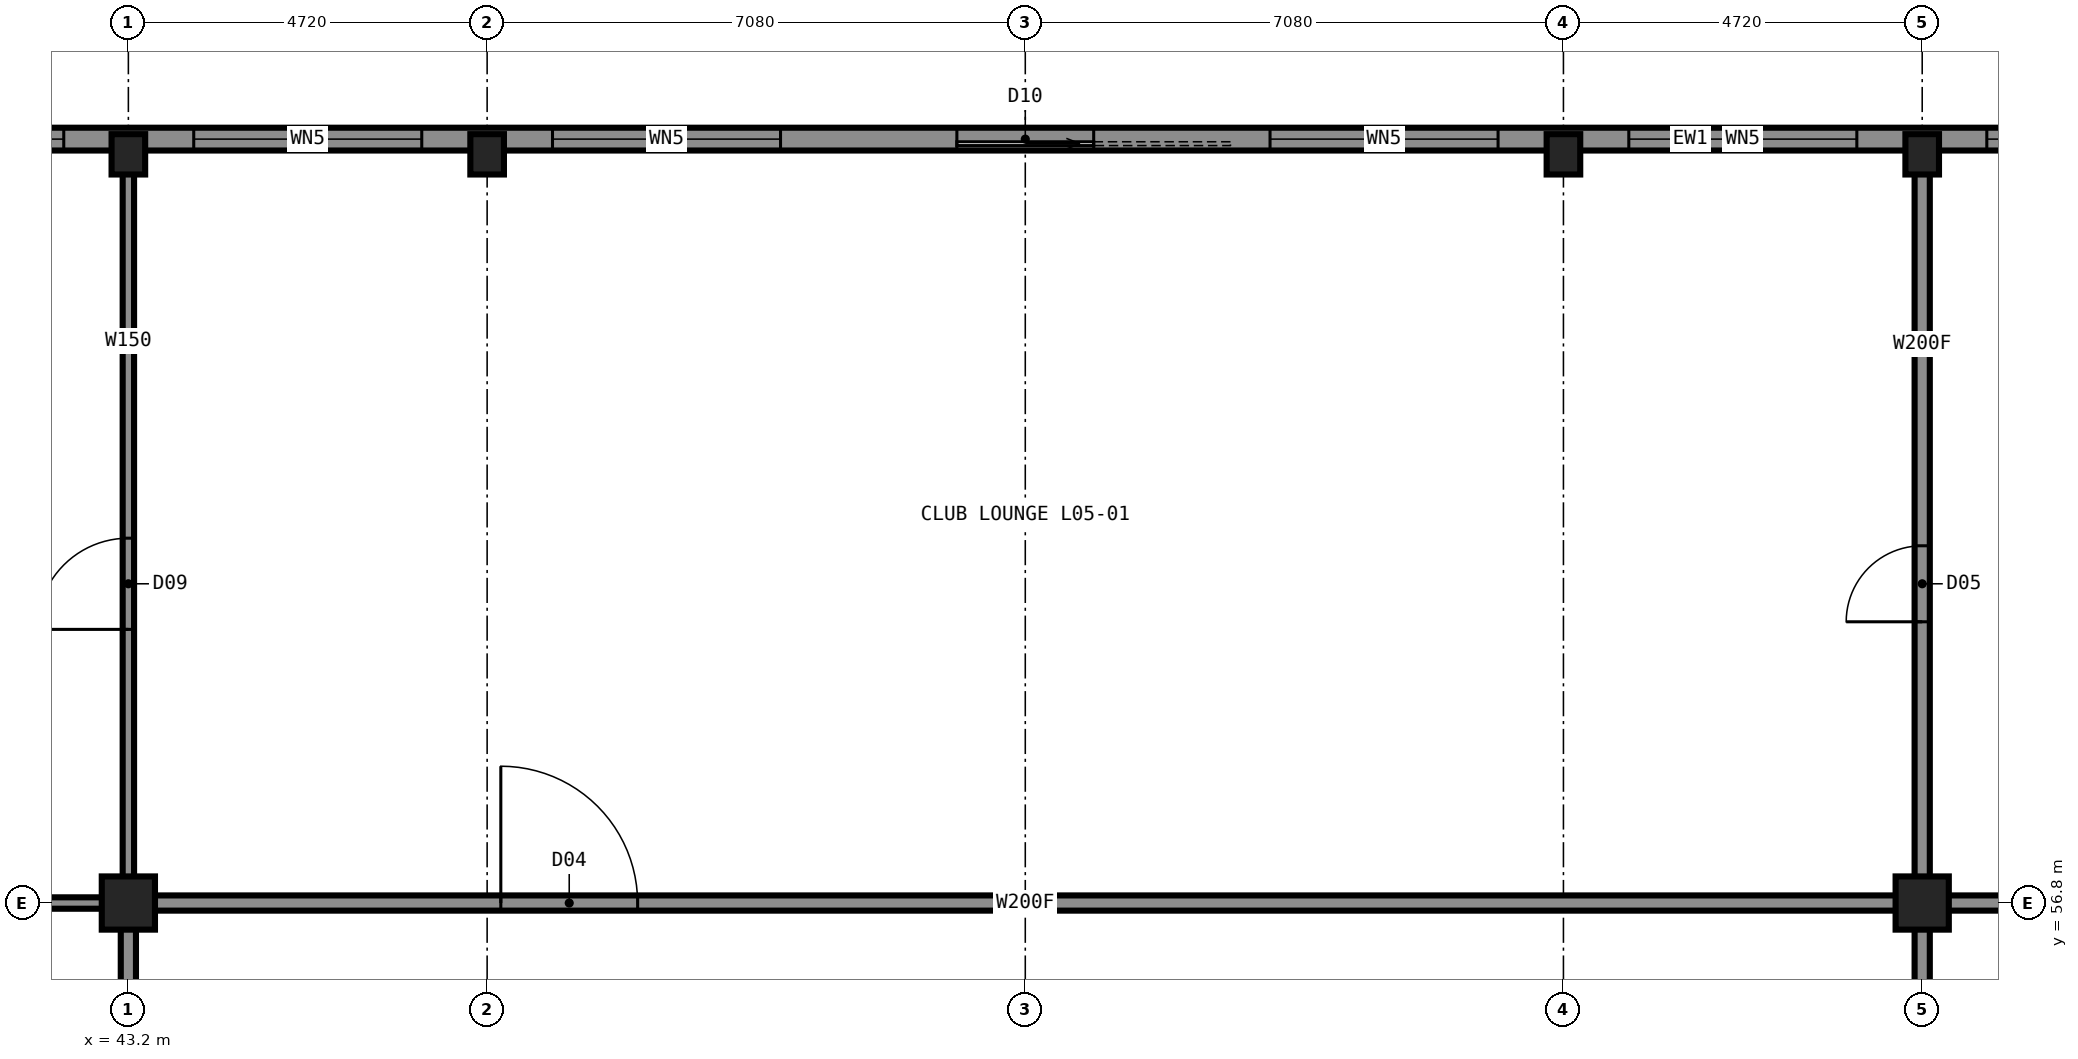
"""IFC4 building model, lengths in metres.
Left out: names, types, materials, properties, quantities, classifications, styles, units other than length and angle.
Written with IfcOpenShell. Run it as: python <this file> out.ifc"""

import sys

from ifc_helpers import new_model, si_unit, direction, frame, frame_2d, origin, origin_2d, place, context, subcontext, project, spatial, rectangle, hollow_rectangle, i_section, extrude, element, fill, save


model = new_model("IFC4")
c1 = context("Model", 3, precision=1e-05, world=origin(), true_north=direction((0.0, 1.0)))
c2 = subcontext(c1, "Body", "Model", "MODEL_VIEW")
j1 = project(units=[si_unit("LENGTHUNIT", "METRE"), si_unit("PLANEANGLEUNIT", "RADIAN")], contexts=[c1])
p1 = place(None, origin())
s1 = spatial("IfcSite", under=j1, at=p1, CompositionType="ELEMENT")
p2 = place(p1, origin())
s2 = spatial("IfcBuilding", under=s1, at=p2, CompositionType="ELEMENT")
p3 = place(p2, frame((0.0, 0.0, 25.0)))
s3 = spatial("IfcBuildingStorey", under=s2, at=p3, CompositionType="ELEMENT", Elevation=25.0)
for number, where, z_axis, x_axis in (
    (1, (43.2, 66.65, 0.0), (0.0, 0.0, 1.0), (1.0, 0.0, 0.0)),
    (2, (47.92, 66.65, 0.0), (0.0, 0.0, 1.0), (1.0, 0.0, 0.0)),
    (3, (62.08, 66.65, 0.0), (0.0, 0.0, 1.0), (1.0, 0.0, 0.0)),
    (4, (66.8, 66.65, 0.0), (0.0, 0.0, 1.0), (1.0, 0.0, 0.0)),
):
    element("IfcColumn", number, at=place(p3, frame(where, z_axis=z_axis, x_axis=x_axis)), inside=s3, PredefinedType="COLUMN", context=c2, shape_type="SweptSolid", body=[
        extrude(i_section(OverallWidth=0.442, OverallDepth=0.531, WebThickness=0.066, FlangeThickness=0.106, at=origin_2d()), origin(), (0.0, 0.0, 1.0), 3.5),
    ])
for number, where, z_axis, x_axis in (
    (5, (43.2, 56.8, 0.0), (0.0, 0.0, 1.0), (1.0, 0.0, 0.0)),
    (6, (66.8, 56.8, 0.0), (0.0, 0.0, 1.0), (1.0, 0.0, 0.0)),
):
    element("IfcColumn", number, at=place(p3, frame(where, z_axis=z_axis, x_axis=x_axis)), inside=s3, PredefinedType="COLUMN", context=c2, shape_type="SweptSolid", body=[
        extrude(hollow_rectangle(XDim=0.7, YDim=0.7, WallThickness=0.06, at=origin_2d()), origin(), (0.0, 0.0, 1.0), 3.5),
    ])
p4 = place(p3, frame((43.2, 56.8, 0.0), z_axis=(0.0, 0.0, 1.0), x_axis=(1.0, 0.0, 0.0)))
e7 = element("IfcWall", 7, at=p4, inside=s3, PredefinedType="PARTITIONING", context=c2, shape_type="SweptSolid", body=[
    extrude(rectangle(XDim=23.6, YDim=0.2, at=frame_2d((11.8, 0.0))), origin(), (0.0, 0.0, 1.0), 3.33),
])
p5 = place(p4, frame((4.9, 0.0, 0.0)))
e8 = element("IfcOpeningElement", 8, at=p5, cuts=e7, PredefinedType="OPENING", context=c2, shape_type="SweptSolid", body=[
    extrude(rectangle(XDim=1.8, YDim=2.2, at=frame_2d((0.9, 1.1))), frame((0.0, 0.11, 0.0), z_axis=(0.0, -1.0, 0.0), x_axis=(1.0, 0.0, 0.0)), (0.0, 0.0, 1.0), 0.22),
])
p6 = place(p3, frame((66.8, 56.8, 0.0), z_axis=(0.0, 0.0, 1.0), x_axis=(1.0, 0.0, 0.0)))
e9 = element("IfcWall", 9, at=p6, inside=s3, PredefinedType="PARTITIONING", context=c2, shape_type="SweptSolid", body=[
    extrude(rectangle(XDim=9.9, YDim=0.2, at=frame_2d((4.95, 0.0))), origin(), (0.0, 0.0, 1.0), 2.573),
])
p7 = place(p3, frame((33.3, 56.8, 0.0), z_axis=(0.0, 0.0, 1.0), x_axis=(1.0, 0.0, 0.0)))
e10 = element("IfcWall", 10, at=p7, inside=s3, PredefinedType="PARTITIONING", context=c2, shape_type="SweptSolid", body=[
    extrude(rectangle(XDim=9.9, YDim=0.15, at=frame_2d((4.95, 0.0))), origin(), (0.0, 0.0, 1.0), 2.573),
])
p8 = place(p3, frame((43.2, 33.2, 0.0), z_axis=(0.0, 0.0, 1.0), x_axis=(0.0, 1.0, 0.0)))
e11 = element("IfcWall", 11, at=p8, inside=s3, PredefinedType="PARTITIONING", context=c2, shape_type="SweptSolid", body=[
    extrude(rectangle(XDim=23.6, YDim=0.2, at=frame_2d((11.8, 0.0))), origin(), (0.0, 0.0, 1.0), 3.33),
])
p9 = place(p8, frame((13.2, 0.0, 0.0)))
e12 = element("IfcOpeningElement", 12, at=p9, cuts=e11, PredefinedType="OPENING", context=c2, shape_type="SweptSolid", body=[
    extrude(rectangle(XDim=1.2, YDim=2.2, at=frame_2d((0.6, 1.1))), frame((0.0, 0.11, 0.0), z_axis=(0.0, -1.0, 0.0), x_axis=(1.0, 0.0, 0.0)), (0.0, 0.0, 1.0), 0.22),
])
p10 = place(p3, frame((43.2, 56.8, 0.0), z_axis=(0.0, 0.0, 1.0), x_axis=(0.0, 1.0, 0.0)))
e13 = element("IfcWall", 13, at=p10, inside=s3, PredefinedType="PARTITIONING", context=c2, shape_type="SweptSolid", body=[
    extrude(rectangle(XDim=9.9, YDim=0.15, at=frame_2d((4.95, 0.0))), origin(), (0.0, 0.0, 1.0), 2.573),
])
p11 = place(p10, frame((3.6, 0.0, 0.0)))
e14 = element("IfcOpeningElement", 14, at=p11, cuts=e13, PredefinedType="OPENING", context=c2, shape_type="SweptSolid", body=[
    extrude(rectangle(XDim=1.2, YDim=2.2, at=frame_2d((0.6, 1.1))), frame((0.0, 0.085, 0.0), z_axis=(0.0, -1.0, 0.0), x_axis=(1.0, 0.0, 0.0)), (0.0, 0.0, 1.0), 0.17),
])
p12 = place(p3, frame((66.8, 33.2, 0.0), z_axis=(0.0, 0.0, 1.0), x_axis=(0.0, 1.0, 0.0)))
e15 = element("IfcWall", 15, at=p12, inside=s3, PredefinedType="PARTITIONING", context=c2, shape_type="SweptSolid", body=[
    extrude(rectangle(XDim=23.6, YDim=0.2, at=frame_2d((11.8, 0.0))), origin(), (0.0, 0.0, 1.0), 3.33),
])
p13 = place(p12, frame((18.2, 0.0, 0.0)))
e16 = element("IfcOpeningElement", 16, at=p13, cuts=e15, PredefinedType="OPENING", context=c2, shape_type="SweptSolid", body=[
    extrude(rectangle(XDim=1.2, YDim=2.2, at=frame_2d((0.6, 1.1))), frame((0.0, 0.11, 0.0), z_axis=(0.0, -1.0, 0.0), x_axis=(1.0, 0.0, 0.0)), (0.0, 0.0, 1.0), 0.22),
])
p14 = place(p12, frame((10.12, 0.0, 0.0)))
e17 = element("IfcOpeningElement", 17, at=p14, cuts=e15, PredefinedType="OPENING", context=c2, shape_type="SweptSolid", body=[
    extrude(rectangle(XDim=1.0, YDim=2.1, at=frame_2d((0.5, 1.05))), frame((0.0, 0.11, 0.0), z_axis=(0.0, -1.0, 0.0), x_axis=(1.0, 0.0, 0.0)), (0.0, 0.0, 1.0), 0.22),
])
p15 = place(p12, frame((12.53, 0.0, 0.0)))
e18 = element("IfcOpeningElement", 18, at=p15, cuts=e15, PredefinedType="OPENING", context=c2, shape_type="SweptSolid", body=[
    extrude(rectangle(XDim=0.9, YDim=2.1, at=frame_2d((0.45, 1.05))), frame((0.0, 0.11, 0.0), z_axis=(0.0, -1.0, 0.0), x_axis=(1.0, 0.0, 0.0)), (0.0, 0.0, 1.0), 0.22),
])
p16 = place(p12, frame((1.91, 0.0, 0.0)))
e19 = element("IfcOpeningElement", 19, at=p16, cuts=e15, PredefinedType="OPENING", context=c2, shape_type="SweptSolid", body=[
    extrude(rectangle(XDim=0.9, YDim=2.1, at=frame_2d((0.45, 1.05))), frame((0.0, 0.11, 0.0), z_axis=(0.0, -1.0, 0.0), x_axis=(1.0, 0.0, 0.0)), (0.0, 0.0, 1.0), 0.22),
])
p17 = place(p12, frame((6.63, 0.0, 0.0)))
e20 = element("IfcOpeningElement", 20, at=p17, cuts=e15, PredefinedType="OPENING", context=c2, shape_type="SweptSolid", body=[
    extrude(rectangle(XDim=0.9, YDim=2.1, at=frame_2d((0.45, 1.05))), frame((0.0, 0.11, 0.0), z_axis=(0.0, -1.0, 0.0), x_axis=(1.0, 0.0, 0.0)), (0.0, 0.0, 1.0), 0.22),
])
p18 = place(p3, frame((66.8, 56.8, 0.0), z_axis=(0.0, 0.0, 1.0), x_axis=(0.0, 1.0, 0.0)))
e21 = element("IfcWall", 21, at=p18, inside=s3, PredefinedType="PARTITIONING", context=c2, shape_type="SweptSolid", body=[
    extrude(rectangle(XDim=9.9, YDim=0.2, at=frame_2d((4.95, 0.0))), origin(), (0.0, 0.0, 1.0), 2.573),
])
p19 = place(p18, frame((3.7, 0.0, 0.0)))
e22 = element("IfcOpeningElement", 22, at=p19, cuts=e21, PredefinedType="OPENING", context=c2, shape_type="SweptSolid", body=[
    extrude(rectangle(XDim=1.0, YDim=2.1, at=frame_2d((0.5, 1.05))), frame((0.0, 0.11, 0.0), z_axis=(0.0, -1.0, 0.0), x_axis=(1.0, 0.0, 0.0)), (0.0, 0.0, 1.0), 0.22),
])
p20 = place(p3, frame((71.5, 66.85, 0.0), z_axis=(0.0, 0.0, 1.0), x_axis=(-1.0, 0.0, 0.0)))
e23 = element("IfcWall", 23, at=p20, inside=s3, PredefinedType="SOLIDWALL", context=c2, shape_type="SweptSolid", body=[
    extrude(rectangle(XDim=33.0, YDim=0.3, at=frame_2d((16.5, 0.0))), origin(), (0.0, 0.0, 1.0), 2.83),
])
p21 = place(p20, frame((0.85, 0.0, 0.3)))
e24 = element("IfcOpeningElement", 24, at=p21, cuts=e23, PredefinedType="OPENING", context=c2, shape_type="SweptSolid", body=[
    extrude(rectangle(XDim=3.0, YDim=2.5, at=frame_2d((1.5, 1.25))), frame((0.0, 0.16, 0.0), z_axis=(0.0, -1.0, 0.0), x_axis=(1.0, 0.0, 0.0)), (0.0, 0.0, 1.0), 0.32),
])
p22 = place(p20, frame((5.56, 0.0, 0.3)))
e25 = element("IfcOpeningElement", 25, at=p22, cuts=e23, PredefinedType="OPENING", context=c2, shape_type="SweptSolid", body=[
    extrude(rectangle(XDim=3.0, YDim=2.5, at=frame_2d((1.5, 1.25))), frame((0.0, 0.16, 0.0), z_axis=(0.0, -1.0, 0.0), x_axis=(1.0, 0.0, 0.0)), (0.0, 0.0, 1.0), 0.32),
])
p23 = place(p20, frame((10.28, 0.0, 0.3)))
e26 = element("IfcOpeningElement", 26, at=p23, cuts=e23, PredefinedType="OPENING", context=c2, shape_type="SweptSolid", body=[
    extrude(rectangle(XDim=3.0, YDim=2.5, at=frame_2d((1.5, 1.25))), frame((0.0, 0.16, 0.0), z_axis=(0.0, -1.0, 0.0), x_axis=(1.0, 0.0, 0.0)), (0.0, 0.0, 1.0), 0.32),
])
p24 = place(p20, frame((15.6, 0.0, 0.0)))
e27 = element("IfcOpeningElement", 27, at=p24, cuts=e23, PredefinedType="OPENING", context=c2, shape_type="SweptSolid", body=[
    extrude(rectangle(XDim=1.8, YDim=2.4, at=frame_2d((0.9, 1.2))), frame((0.0, 0.16, 0.0), z_axis=(0.0, -1.0, 0.0), x_axis=(1.0, 0.0, 0.0)), (0.0, 0.0, 1.0), 0.32),
])
p25 = place(p20, frame((19.72, 0.0, 0.3)))
e28 = element("IfcOpeningElement", 28, at=p25, cuts=e23, PredefinedType="OPENING", context=c2, shape_type="SweptSolid", body=[
    extrude(rectangle(XDim=3.0, YDim=2.5, at=frame_2d((1.5, 1.25))), frame((0.0, 0.16, 0.0), z_axis=(0.0, -1.0, 0.0), x_axis=(1.0, 0.0, 0.0)), (0.0, 0.0, 1.0), 0.32),
])
p26 = place(p20, frame((24.44, 0.0, 0.3)))
e29 = element("IfcOpeningElement", 29, at=p26, cuts=e23, PredefinedType="OPENING", context=c2, shape_type="SweptSolid", body=[
    extrude(rectangle(XDim=3.0, YDim=2.5, at=frame_2d((1.5, 1.25))), frame((0.0, 0.16, 0.0), z_axis=(0.0, -1.0, 0.0), x_axis=(1.0, 0.0, 0.0)), (0.0, 0.0, 1.0), 0.32),
])
p27 = place(p20, frame((29.15, 0.0, 0.3)))
e30 = element("IfcOpeningElement", 30, at=p27, cuts=e23, PredefinedType="OPENING", context=c2, shape_type="SweptSolid", body=[
    extrude(rectangle(XDim=3.0, YDim=2.5, at=frame_2d((1.5, 1.25))), frame((0.0, 0.16, 0.0), z_axis=(0.0, -1.0, 0.0), x_axis=(1.0, 0.0, 0.0)), (0.0, 0.0, 1.0), 0.32),
])
p28 = place(p5, origin())
e31 = element("IfcDoor", 31, at=p28, inside=s3, OperationType="DOUBLE_DOOR_SINGLE_SWING", PredefinedType="DOOR", context=c2, shape_type="SweptSolid", body=[
    extrude(rectangle(XDim=1.8, YDim=2.2, at=frame_2d((0.9, 1.1))), frame((0.0, 0.025, 0.0), z_axis=(0.0, -1.0, 0.0), x_axis=(1.0, 0.0, 0.0)), (0.0, 0.0, 1.0), 0.05),
])
fill(e8, e31)
p29 = place(p19, origin())
e32 = element("IfcDoor", 32, at=p29, inside=s3, OperationType="SINGLE_SWING_LEFT", PredefinedType="DOOR", context=c2, shape_type="SweptSolid", body=[
    extrude(rectangle(XDim=1.0, YDim=2.1, at=frame_2d((0.5, 1.05))), frame((0.0, 0.025, 0.0), z_axis=(0.0, -1.0, 0.0), x_axis=(1.0, 0.0, 0.0)), (0.0, 0.0, 1.0), 0.05),
])
fill(e22, e32)
p30 = place(p11, origin())
e33 = element("IfcDoor", 33, at=p30, inside=s3, OperationType="SINGLE_SWING_LEFT", PredefinedType="DOOR", context=c2, shape_type="SweptSolid", body=[
    extrude(rectangle(XDim=1.2, YDim=2.2, at=frame_2d((0.6, 1.1))), frame((0.0, 0.025, 0.0), z_axis=(0.0, -1.0, 0.0), x_axis=(1.0, 0.0, 0.0)), (0.0, 0.0, 1.0), 0.05),
])
fill(e14, e33)
p31 = place(p21, origin())
e34 = element("IfcWindow", 34, at=p31, inside=s3, PartitioningType="SINGLE_PANEL", PredefinedType="WINDOW", context=c2, shape_type="SweptSolid", body=[
    extrude(rectangle(XDim=3.0, YDim=2.5, at=frame_2d((1.5, 1.25))), frame((0.0, 0.03, 0.0), z_axis=(0.0, -1.0, 0.0), x_axis=(1.0, 0.0, 0.0)), (0.0, 0.0, 1.0), 0.06),
])
fill(e24, e34)
p32 = place(p22, origin())
e35 = element("IfcWindow", 35, at=p32, inside=s3, PartitioningType="SINGLE_PANEL", PredefinedType="WINDOW", context=c2, shape_type="SweptSolid", body=[
    extrude(rectangle(XDim=3.0, YDim=2.5, at=frame_2d((1.5, 1.25))), frame((0.0, 0.03, 0.0), z_axis=(0.0, -1.0, 0.0), x_axis=(1.0, 0.0, 0.0)), (0.0, 0.0, 1.0), 0.06),
])
fill(e25, e35)
p33 = place(p23, origin())
e36 = element("IfcWindow", 36, at=p33, inside=s3, PartitioningType="SINGLE_PANEL", PredefinedType="WINDOW", context=c2, shape_type="SweptSolid", body=[
    extrude(rectangle(XDim=3.0, YDim=2.5, at=frame_2d((1.5, 1.25))), frame((0.0, 0.03, 0.0), z_axis=(0.0, -1.0, 0.0), x_axis=(1.0, 0.0, 0.0)), (0.0, 0.0, 1.0), 0.06),
])
fill(e26, e36)
p34 = place(p24, origin())
e37 = element("IfcDoor", 37, at=p34, inside=s3, OperationType="SLIDING_TO_LEFT", PredefinedType="DOOR", context=c2, shape_type="SweptSolid", body=[
    extrude(rectangle(XDim=1.8, YDim=2.4, at=frame_2d((0.9, 1.2))), frame((0.0, 0.025, 0.0), z_axis=(0.0, -1.0, 0.0), x_axis=(1.0, 0.0, 0.0)), (0.0, 0.0, 1.0), 0.05),
])
fill(e27, e37)
p35 = place(p25, origin())
e38 = element("IfcWindow", 38, at=p35, inside=s3, PartitioningType="SINGLE_PANEL", PredefinedType="WINDOW", context=c2, shape_type="SweptSolid", body=[
    extrude(rectangle(XDim=3.0, YDim=2.5, at=frame_2d((1.5, 1.25))), frame((0.0, 0.03, 0.0), z_axis=(0.0, -1.0, 0.0), x_axis=(1.0, 0.0, 0.0)), (0.0, 0.0, 1.0), 0.06),
])
fill(e28, e38)
p36 = place(p26, origin())
e39 = element("IfcWindow", 39, at=p36, inside=s3, PartitioningType="SINGLE_PANEL", PredefinedType="WINDOW", context=c2, shape_type="SweptSolid", body=[
    extrude(rectangle(XDim=3.0, YDim=2.5, at=frame_2d((1.5, 1.25))), frame((0.0, 0.03, 0.0), z_axis=(0.0, -1.0, 0.0), x_axis=(1.0, 0.0, 0.0)), (0.0, 0.0, 1.0), 0.06),
])
fill(e29, e39)
p37 = place(p27, origin())
e40 = element("IfcWindow", 40, at=p37, inside=s3, PartitioningType="SINGLE_PANEL", PredefinedType="WINDOW", context=c2, shape_type="SweptSolid", body=[
    extrude(rectangle(XDim=3.0, YDim=2.5, at=frame_2d((1.5, 1.25))), frame((0.0, 0.03, 0.0), z_axis=(0.0, -1.0, 0.0), x_axis=(1.0, 0.0, 0.0)), (0.0, 0.0, 1.0), 0.06),
])
fill(e30, e40)
save(model, sys.argv[1])
